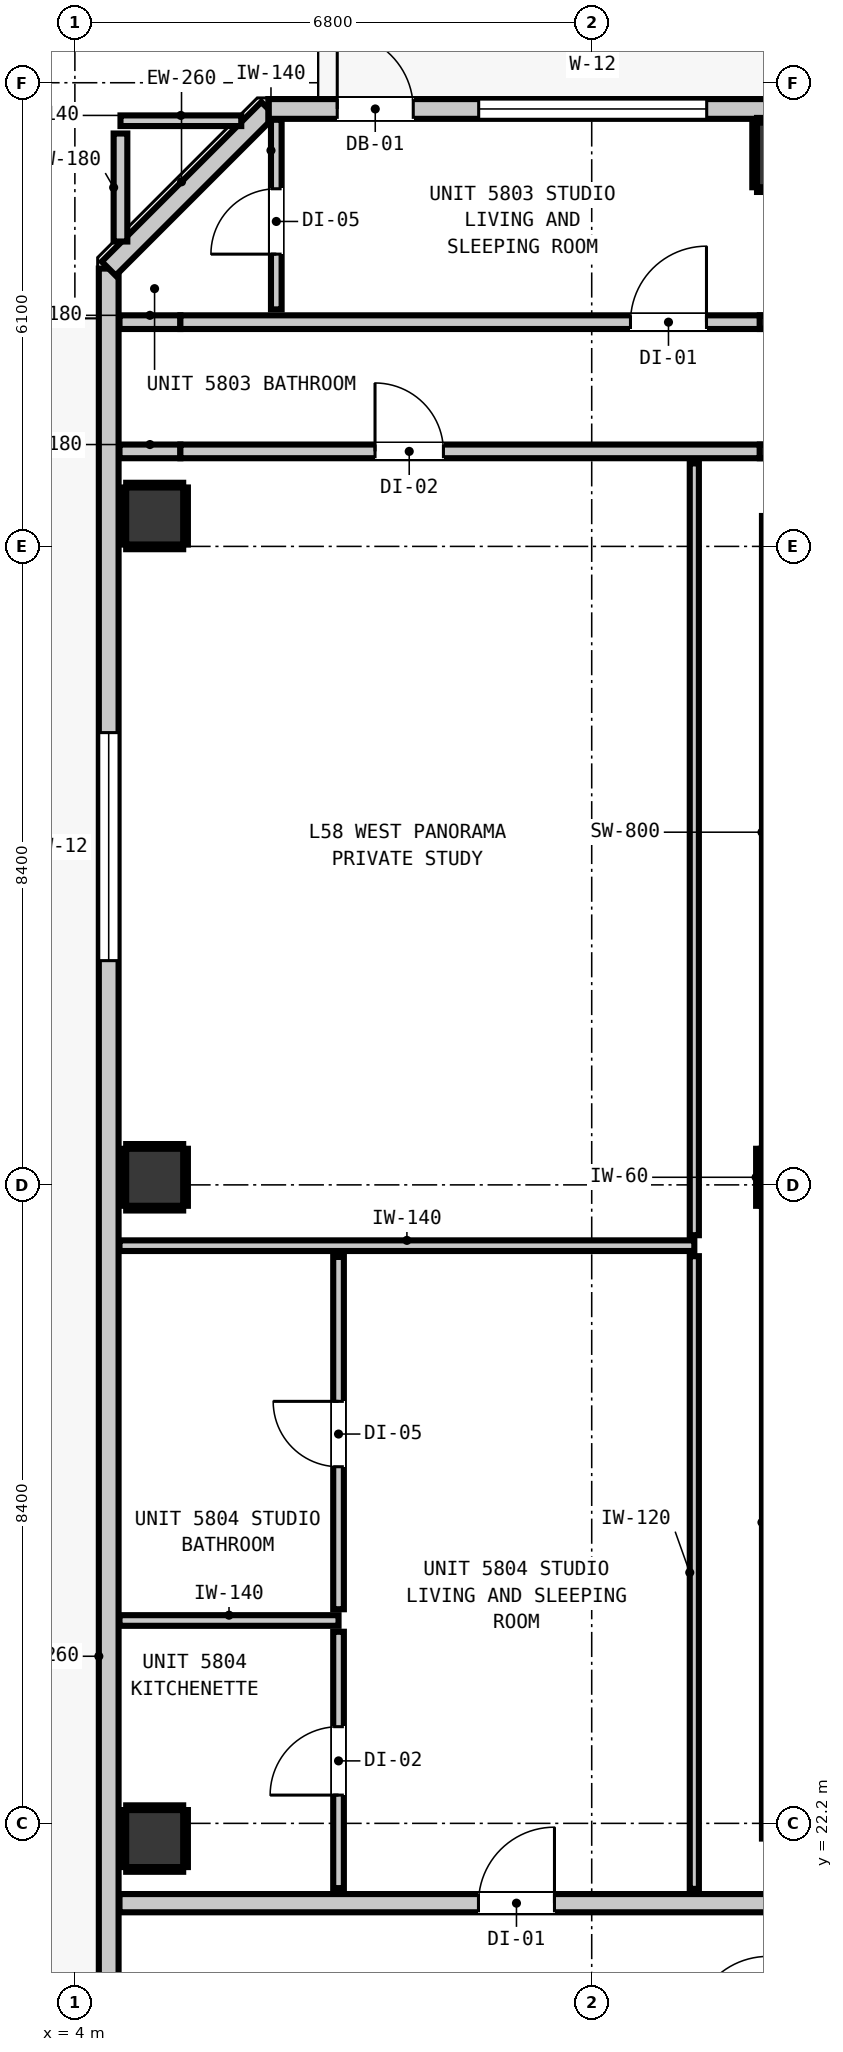
"""IFC4 building model, lengths in metres.
Left out: names, types, materials, properties, quantities, classifications, styles, units other than length and angle.
Written with IfcOpenShell. Run it as: python <this file> out.ifc"""

import sys

from ifc_helpers import new_model, si_unit, direction, frame, frame_2d, origin, origin_2d, place, context, subcontext, project, spatial, rectangle, extrude, element, fill, save


model = new_model("IFC4")
c1 = context("Model", 3, precision=1e-05, world=origin(), true_north=direction((0.0, 1.0)))
c2 = subcontext(c1, "Body", "Model", "MODEL_VIEW")
j1 = project(units=[si_unit("LENGTHUNIT", "METRE"), si_unit("PLANEANGLEUNIT", "RADIAN")], contexts=[c1])
p1 = place(None, origin())
s1 = spatial("IfcSite", under=j1, at=p1, CompositionType="ELEMENT")
p2 = place(p1, origin())
s2 = spatial("IfcBuilding", under=s1, at=p2, CompositionType="ELEMENT")
p3 = place(p2, frame((0.0, 0.0, 200.12)))
s3 = spatial("IfcBuildingStorey", under=s2, at=p3, CompositionType="ELEMENT", Elevation=200.12)
p4 = place(p3, frame((13.4, 30.7, 0.0), z_axis=(0.0, 0.0, 1.0), x_axis=(1.0, 0.0, 0.0)))
e1 = element("IfcColumn", 1, at=p4, inside=s3, PredefinedType="COLUMN", context=c2, shape_type="SweptSolid", body=[
    extrude(rectangle(XDim=0.75, YDim=0.75, at=origin_2d()), origin(), (0.0, 0.0, 1.0), 3.32),
])
p5 = place(p3, frame((13.44, 22.0, 0.0), z_axis=(0.0, 0.0, 1.0), x_axis=(0.0, 1.0, 0.0)))
e2 = element("IfcWall", 2, at=p5, inside=s3, PredefinedType="SHEAR", context=c2, shape_type="SweptSolid", body=[
    extrude(rectangle(XDim=8.32, YDim=0.8, at=frame_2d((4.16, 0.0))), origin(), (0.0, 0.0, 1.0), 3.32),
])
p6 = place(p3, frame((13.44, 31.08, 0.0), z_axis=(0.0, 0.0, 1.0), x_axis=(0.0, 1.0, 0.0)))
e3 = element("IfcWall", 3, at=p6, inside=s3, PredefinedType="SHEAR", context=c2, shape_type="SweptSolid", body=[
    extrude(rectangle(XDim=8.32, YDim=0.8, at=frame_2d((4.16, 0.0))), origin(), (0.0, 0.0, 1.0), 3.32),
])
p7 = place(p3, frame((13.4, 44.15, 0.0), z_axis=(0.0, 0.0, 1.0), x_axis=(1.0, 0.0, 0.0)))
e4 = element("IfcColumn", 4, at=p7, inside=s3, PredefinedType="COLUMN", context=c2, shape_type="SweptSolid", body=[
    extrude(rectangle(XDim=0.85, YDim=0.85, at=origin_2d()), origin(), (0.0, 0.0, 1.0), 3.32),
])
for number, where, z_axis, x_axis in (
    (5, (5.05, 22.0, 0.0), (0.0, 0.0, 1.0), (1.0, 0.0, 0.0)),
    (6, (5.05, 30.7, 0.0), (0.0, 0.0, 1.0), (1.0, 0.0, 0.0)),
    (7, (5.05, 39.4, 0.0), (0.0, 0.0, 1.0), (1.0, 0.0, 0.0)),
):
    element("IfcColumn", number, at=place(p3, frame(where, z_axis=z_axis, x_axis=x_axis)), inside=s3, PredefinedType="COLUMN", context=c2, shape_type="SweptSolid", body=[
        extrude(rectangle(XDim=0.75, YDim=0.75, at=origin_2d()), origin(), (0.0, 0.0, 1.0), 3.32),
    ])
p8 = place(p3, frame((4.445, 12.345, 0.0), z_axis=(0.0, 0.0, 1.0), x_axis=(0.0, 1.0, 0.0)))
e8 = element("IfcWall", 8, at=p8, inside=s3, PredefinedType="STANDARD", context=c2, shape_type="SweptSolid", body=[
    extrude(rectangle(XDim=30.31, YDim=0.26, at=frame_2d((15.155, 0.0))), origin(), (0.0, 0.0, 1.0), 3.1),
])
p9 = place(p8, frame((0.91, 0.0, 0.0)))
e9 = element("IfcOpeningElement", 9, at=p9, cuts=e8, PredefinedType="OPENING", context=c2, shape_type="SweptSolid", body=[
    extrude(rectangle(XDim=1.0, YDim=2.15, at=frame_2d((0.5, 1.075))), frame((0.0, 0.14, 0.0), z_axis=(0.0, -1.0, 0.0), x_axis=(1.0, 0.0, 0.0)), (0.0, 0.0, 1.0), 0.28),
])
p10 = place(p8, frame((2.322, 0.0, 0.85)))
e10 = element("IfcOpeningElement", 10, at=p10, cuts=e8, PredefinedType="OPENING", context=c2, shape_type="SweptSolid", body=[
    extrude(rectangle(XDim=0.58, YDim=1.5, at=frame_2d((0.29, 0.75))), frame((0.0, 0.14, 0.0), z_axis=(0.0, -1.0, 0.0), x_axis=(1.0, 0.0, 0.0)), (0.0, 0.0, 1.0), 0.28),
])
p11 = place(p8, frame((21.205, 0.0, 0.85)))
e11 = element("IfcOpeningElement", 11, at=p11, cuts=e8, PredefinedType="OPENING", context=c2, shape_type="SweptSolid", body=[
    extrude(rectangle(XDim=3.0, YDim=2.1, at=frame_2d((1.5, 1.05))), frame((0.0, 0.14, 0.0), z_axis=(0.0, -1.0, 0.0), x_axis=(1.0, 0.0, 0.0)), (0.0, 0.0, 1.0), 0.28),
])
p12 = place(p3, frame((4.445, 42.655, 0.0), z_axis=(0.0, 0.0, 1.0), x_axis=(0.707106781187, 0.707106781187, 0.0)))
e12 = element("IfcWall", 12, at=p12, inside=s3, PredefinedType="STANDARD", context=c2, shape_type="SweptSolid", body=[
    extrude(rectangle(XDim=2.97, YDim=0.26, at=frame_2d((1.485, 0.0))), origin(), (0.0, 0.0, 1.0), 3.1),
])
p13 = place(p3, frame((6.545, 44.755, 0.0), z_axis=(0.0, 0.0, 1.0), x_axis=(1.0, 0.0, 0.0)))
e13 = element("IfcWall", 13, at=p13, inside=s3, PredefinedType="STANDARD", context=c2, shape_type="SweptSolid", body=[
    extrude(rectangle(XDim=32.71, YDim=0.26, at=frame_2d((16.355, 0.0))), origin(), (0.0, 0.0, 1.0), 3.1),
])
p14 = place(p13, frame((0.907, 0.0, 0.0)))
e14 = element("IfcOpeningElement", 14, at=p14, cuts=e13, PredefinedType="OPENING", context=c2, shape_type="SweptSolid", body=[
    extrude(rectangle(XDim=1.0, YDim=2.15, at=frame_2d((0.5, 1.075))), frame((0.0, 0.14, 0.0), z_axis=(0.0, -1.0, 0.0), x_axis=(1.0, 0.0, 0.0)), (0.0, 0.0, 1.0), 0.28),
])
p15 = place(p13, frame((2.768, 0.0, 0.85)))
e15 = element("IfcOpeningElement", 15, at=p15, cuts=e13, PredefinedType="OPENING", context=c2, shape_type="SweptSolid", body=[
    extrude(rectangle(XDim=3.0, YDim=2.1, at=frame_2d((1.5, 1.05))), frame((0.0, 0.14, 0.0), z_axis=(0.0, -1.0, 0.0), x_axis=(1.0, 0.0, 0.0)), (0.0, 0.0, 1.0), 0.28),
])
p16 = place(p13, frame((16.955, 0.0, 0.85)))
e16 = element("IfcOpeningElement", 16, at=p16, cuts=e13, PredefinedType="OPENING", context=c2, shape_type="SweptSolid", body=[
    extrude(rectangle(XDim=3.0, YDim=2.1, at=frame_2d((1.5, 1.05))), frame((0.0, 0.14, 0.0), z_axis=(0.0, -1.0, 0.0), x_axis=(1.0, 0.0, 0.0)), (0.0, 0.0, 1.0), 0.28),
])
p17 = place(p3, frame((4.587, 21.15, 0.0), z_axis=(0.0, 0.0, 1.0), x_axis=(1.0, 0.0, 0.0)))
e17 = element("IfcWall", 17, at=p17, inside=s3, PredefinedType="PARTITIONING", context=c2, shape_type="SweptSolid", body=[
    extrude(rectangle(XDim=36.626, YDim=0.24, at=frame_2d((18.313, 0.0))), origin(), (0.0, 0.0, 1.0), 3.1),
])
p18 = place(p17, frame((13.623, 0.0, 0.0)))
e18 = element("IfcOpeningElement", 18, at=p18, cuts=e17, PredefinedType="OPENING", context=c2, shape_type="SweptSolid", body=[
    extrude(rectangle(XDim=1.1, YDim=2.15, at=frame_2d((0.55, 1.075))), frame((0.0, 0.13, 0.0), z_axis=(0.0, -1.0, 0.0), x_axis=(1.0, 0.0, 0.0)), (0.0, 0.0, 1.0), 0.26),
])
p19 = place(p17, frame((4.723, 0.0, 0.0)))
e19 = element("IfcOpeningElement", 19, at=p19, cuts=e17, PredefinedType="OPENING", context=c2, shape_type="SweptSolid", body=[
    extrude(rectangle(XDim=1.0, YDim=2.15, at=frame_2d((0.5, 1.075))), frame((0.0, 0.13, 0.0), z_axis=(0.0, -1.0, 0.0), x_axis=(1.0, 0.0, 0.0)), (0.0, 0.0, 1.0), 0.26),
])
p20 = place(p3, frame((4.587, 40.25, 0.0), z_axis=(0.0, 0.0, 1.0), x_axis=(1.0, 0.0, 0.0)))
e20 = element("IfcWall", 20, at=p20, inside=s3, PredefinedType="PARTITIONING", context=c2, shape_type="SweptSolid", body=[
    extrude(rectangle(XDim=0.801, YDim=0.18, at=frame_2d((0.4, 0.0))), origin(), (0.0, 0.0, 1.0), 3.1),
])
p21 = place(p3, frame((5.388, 40.25, 0.0), z_axis=(0.0, 0.0, 1.0), x_axis=(1.0, 0.0, 0.0)))
e21 = element("IfcWall", 21, at=p21, inside=s3, PredefinedType="PARTITIONING", context=c2, shape_type="SweptSolid", body=[
    extrude(rectangle(XDim=7.624, YDim=0.18, at=frame_2d((3.812, 0.0))), origin(), (0.0, 0.0, 1.0), 2.477),
])
p22 = place(p21, frame((2.561, 0.0, 0.0)))
e22 = element("IfcOpeningElement", 22, at=p22, cuts=e21, PredefinedType="OPENING", context=c2, shape_type="SweptSolid", body=[
    extrude(rectangle(XDim=0.9, YDim=2.1, at=frame_2d((0.45, 1.05))), frame((0.0, 0.1, 0.0), z_axis=(0.0, -1.0, 0.0), x_axis=(1.0, 0.0, 0.0)), (0.0, 0.0, 1.0), 0.2),
])
p23 = place(p3, frame((13.012, 40.25, 0.0), z_axis=(0.0, 0.0, 1.0), x_axis=(1.0, 0.0, 0.0)))
e23 = element("IfcWall", 23, at=p23, inside=s3, PredefinedType="PARTITIONING", context=c2, shape_type="SweptSolid", body=[
    extrude(rectangle(XDim=28.201, YDim=0.18, at=frame_2d((14.101, 0.0))), origin(), (0.0, 0.0, 1.0), 3.1),
])
p24 = place(p23, frame((4.423, 0.0, 0.0)))
e24 = element("IfcOpeningElement", 24, at=p24, cuts=e23, PredefinedType="OPENING", context=c2, shape_type="SweptSolid", body=[
    extrude(rectangle(XDim=1.4, YDim=2.15, at=frame_2d((0.7, 1.075))), frame((0.0, 0.1, 0.0), z_axis=(0.0, -1.0, 0.0), x_axis=(1.0, 0.0, 0.0)), (0.0, 0.0, 1.0), 0.2),
])
p25 = place(p3, frame((4.587, 41.95, 0.0), z_axis=(0.0, 0.0, 1.0), x_axis=(1.0, 0.0, 0.0)))
e25 = element("IfcWall", 25, at=p25, inside=s3, PredefinedType="PARTITIONING", context=c2, shape_type="SweptSolid", body=[
    extrude(rectangle(XDim=0.801, YDim=0.18, at=frame_2d((0.4, 0.0))), origin(), (0.0, 0.0, 1.0), 3.1),
])
p26 = place(p3, frame((5.388, 41.95, 0.0), z_axis=(0.0, 0.0, 1.0), x_axis=(1.0, 0.0, 0.0)))
e26 = element("IfcWall", 26, at=p26, inside=s3, PredefinedType="PARTITIONING", context=c2, shape_type="SweptSolid", body=[
    extrude(rectangle(XDim=7.624, YDim=0.18, at=frame_2d((3.812, 0.0))), origin(), (0.0, 0.0, 1.0), 2.477),
])
p27 = place(p26, frame((5.922, 0.0, 0.0)))
e27 = element("IfcOpeningElement", 27, at=p27, cuts=e26, PredefinedType="OPENING", context=c2, shape_type="SweptSolid", body=[
    extrude(rectangle(XDim=1.0, YDim=2.15, at=frame_2d((0.5, 1.075))), frame((0.0, 0.1, 0.0), z_axis=(0.0, -1.0, 0.0), x_axis=(1.0, 0.0, 0.0)), (0.0, 0.0, 1.0), 0.2),
])
p28 = place(p3, frame((13.012, 41.95, 0.0), z_axis=(0.0, 0.0, 1.0), x_axis=(1.0, 0.0, 0.0)))
e28 = element("IfcWall", 28, at=p28, inside=s3, PredefinedType="PARTITIONING", context=c2, shape_type="SweptSolid", body=[
    extrude(rectangle(XDim=28.201, YDim=0.18, at=frame_2d((14.101, 0.0))), origin(), (0.0, 0.0, 1.0), 3.1),
])
p29 = place(p28, frame((16.674, 0.0, 0.0)))
e29 = element("IfcOpeningElement", 29, at=p29, cuts=e28, PredefinedType="OPENING", context=c2, shape_type="SweptSolid", body=[
    extrude(rectangle(XDim=0.9, YDim=2.1, at=frame_2d((0.45, 1.05))), frame((0.0, 0.1, 0.0), z_axis=(0.0, -1.0, 0.0), x_axis=(1.0, 0.0, 0.0)), (0.0, 0.0, 1.0), 0.2),
])
p30 = place(p3, frame((4.587, 24.869, 0.0), z_axis=(0.0, 0.0, 1.0), x_axis=(1.0, 0.0, 0.0)))
e30 = element("IfcWall", 30, at=p30, inside=s3, PredefinedType="PARTITIONING", context=c2, shape_type="SweptSolid", body=[
    extrude(rectangle(XDim=2.882, YDim=0.14, at=frame_2d((1.441, 0.0))), origin(), (0.0, 0.0, 1.0), 3.1),
])
p31 = place(p3, frame((4.587, 29.8, 0.0), z_axis=(0.0, 0.0, 1.0), x_axis=(1.0, 0.0, 0.0)))
e31 = element("IfcWall", 31, at=p31, inside=s3, PredefinedType="PARTITIONING", context=c2, shape_type="SweptSolid", body=[
    extrude(rectangle(XDim=7.563, YDim=0.14, at=frame_2d((3.781, 0.0))), origin(), (0.0, 0.0, 1.0), 3.1),
])
p32 = place(p3, frame((4.6, 44.6, 0.0), z_axis=(0.0, 0.0, 1.0), x_axis=(1.0, 0.0, 0.0)))
e32 = element("IfcWall", 32, at=p32, inside=s3, PredefinedType="PARTITIONING", context=c2, shape_type="SweptSolid", body=[
    extrude(rectangle(XDim=1.589, YDim=0.14, at=frame_2d((0.794, 0.0))), origin(), (0.0, 0.0, 1.0), 3.1),
])
p33 = place(p3, frame((4.6, 43.011, 0.0), z_axis=(0.0, 0.0, 1.0), x_axis=(0.0, 1.0, 0.0)))
e33 = element("IfcWall", 33, at=p33, inside=s3, PredefinedType="PARTITIONING", context=c2, shape_type="SweptSolid", body=[
    extrude(rectangle(XDim=1.421, YDim=0.18, at=frame_2d((0.71, 0.0))), origin(), (0.0, 0.0, 1.0), 3.1),
])
p34 = place(p3, frame((6.65, 42.118, 0.0), z_axis=(0.0, 0.0, 1.0), x_axis=(0.0, 1.0, 0.0)))
e34 = element("IfcWall", 34, at=p34, inside=s3, PredefinedType="PARTITIONING", context=c2, shape_type="SweptSolid", body=[
    extrude(rectangle(XDim=2.495, YDim=0.14, at=frame_2d((1.248, 0.0))), origin(), (0.0, 0.0, 1.0), 3.1),
])
p35 = place(p34, frame((0.727, 0.0, 0.0)))
e35 = element("IfcOpeningElement", 35, at=p35, cuts=e34, PredefinedType="OPENING", context=c2, shape_type="SweptSolid", body=[
    extrude(rectangle(XDim=0.86, YDim=2.02, at=frame_2d((0.43, 1.01))), frame((0.0, 0.08, 0.0), z_axis=(0.0, -1.0, 0.0), x_axis=(1.0, 0.0, 0.0)), (0.0, 0.0, 1.0), 0.16),
])
p36 = place(p3, frame((7.469, 21.348, 0.0), z_axis=(0.0, 0.0, 1.0), x_axis=(0.0, 1.0, 0.0)))
e36 = element("IfcWall", 36, at=p36, inside=s3, PredefinedType="PARTITIONING", context=c2, shape_type="SweptSolid", body=[
    extrude(rectangle(XDim=3.373, YDim=0.14, at=frame_2d((1.687, 0.0))), origin(), (0.0, 0.0, 1.0), 3.1),
])
p37 = place(p36, frame((1.224, 0.0, 0.0)))
e37 = element("IfcOpeningElement", 37, at=p37, cuts=e36, PredefinedType="OPENING", context=c2, shape_type="SweptSolid", body=[
    extrude(rectangle(XDim=0.9, YDim=2.1, at=frame_2d((0.45, 1.05))), frame((0.0, 0.08, 0.0), z_axis=(0.0, -1.0, 0.0), x_axis=(1.0, 0.0, 0.0)), (0.0, 0.0, 1.0), 0.16),
])
p38 = place(p3, frame((7.469, 25.017, 0.0), z_axis=(0.0, 0.0, 1.0), x_axis=(0.0, 1.0, 0.0)))
e38 = element("IfcWall", 38, at=p38, inside=s3, PredefinedType="PARTITIONING", context=c2, shape_type="SweptSolid", body=[
    extrude(rectangle(XDim=4.635, YDim=0.14, at=frame_2d((2.317, 0.0))), origin(), (0.0, 0.0, 1.0), 3.1),
])
p39 = place(p38, frame((1.875, 0.0, 0.0)))
e39 = element("IfcOpeningElement", 39, at=p39, cuts=e38, PredefinedType="OPENING", context=c2, shape_type="SweptSolid", body=[
    extrude(rectangle(XDim=0.86, YDim=2.02, at=frame_2d((0.43, 1.01))), frame((0.0, 0.08, 0.0), z_axis=(0.0, -1.0, 0.0), x_axis=(1.0, 0.0, 0.0)), (0.0, 0.0, 1.0), 0.16),
])
p40 = place(p3, frame((12.15, 21.338, 0.0), z_axis=(0.0, 0.0, 1.0), x_axis=(0.0, 1.0, 0.0)))
e40 = element("IfcWall", 40, at=p40, inside=s3, PredefinedType="PARTITIONING", context=c2, shape_type="SweptSolid", body=[
    extrude(rectangle(XDim=8.324, YDim=0.12, at=frame_2d((4.162, 0.0))), origin(), (0.0, 0.0, 1.0), 3.1),
])
p41 = place(p3, frame((12.15, 29.938, 0.0), z_axis=(0.0, 0.0, 1.0), x_axis=(0.0, 1.0, 0.0)))
e41 = element("IfcWall", 41, at=p41, inside=s3, PredefinedType="PARTITIONING", context=c2, shape_type="SweptSolid", body=[
    extrude(rectangle(XDim=10.154, YDim=0.12, at=frame_2d((5.077, 0.0))), origin(), (0.0, 0.0, 1.0), 3.1),
])
p42 = place(p3, frame((12.993, 30.325, 0.0), z_axis=(0.0, 0.0, 1.0), x_axis=(0.0, 1.0, 0.0)))
e42 = element("IfcWall", 42, at=p42, inside=s3, PredefinedType="PARTITIONING", context=c2, shape_type="SweptSolid", body=[
    extrude(rectangle(XDim=0.75, YDim=0.06, at=frame_2d((0.375, 0.0))), origin(), (0.0, 0.0, 1.0), 1.45),
])
for number, where, z_axis, x_axis in (
    (43, (12.975, 43.693, 0.0), (0.0, 0.0, 1.0), (1.0, 0.0, 0.0)),
    (44, (12.975, 44.607, 0.0), (0.0, 0.0, 1.0), (1.0, 0.0, 0.0)),
    (45, (12.943, 43.725, 0.0), (0.0, 0.0, 1.0), (0.0, 1.0, 0.0)),
):
    element("IfcWall", number, at=place(p3, frame(where, z_axis=z_axis, x_axis=x_axis)), inside=s3, PredefinedType="PARTITIONING", context=c2, shape_type="SweptSolid", body=[
        extrude(rectangle(XDim=0.85, YDim=0.06, at=frame_2d((0.425, 0.0))), origin(), (0.0, 0.0, 1.0), 1.45),
    ])
for number, where, z_axis, x_axis in (
    (46, (4.675, 21.593, 0.0), (0.0, 0.0, 1.0), (1.0, 0.0, 0.0)),
    (47, (4.675, 22.407, 0.0), (0.0, 0.0, 1.0), (1.0, 0.0, 0.0)),
    (48, (4.643, 21.625, 0.0), (0.0, 0.0, 1.0), (0.0, 1.0, 0.0)),
    (49, (5.457, 21.625, 0.0), (0.0, 0.0, 1.0), (0.0, 1.0, 0.0)),
    (50, (4.675, 30.293, 0.0), (0.0, 0.0, 1.0), (1.0, 0.0, 0.0)),
    (51, (4.675, 31.107, 0.0), (0.0, 0.0, 1.0), (1.0, 0.0, 0.0)),
    (52, (4.643, 30.325, 0.0), (0.0, 0.0, 1.0), (0.0, 1.0, 0.0)),
    (53, (5.457, 30.325, 0.0), (0.0, 0.0, 1.0), (0.0, 1.0, 0.0)),
    (54, (4.675, 38.993, 0.0), (0.0, 0.0, 1.0), (1.0, 0.0, 0.0)),
    (55, (4.675, 39.807, 0.0), (0.0, 0.0, 1.0), (1.0, 0.0, 0.0)),
    (56, (4.643, 39.025, 0.0), (0.0, 0.0, 1.0), (0.0, 1.0, 0.0)),
    (57, (5.457, 39.025, 0.0), (0.0, 0.0, 1.0), (0.0, 1.0, 0.0)),
):
    element("IfcWall", number, at=place(p3, frame(where, z_axis=z_axis, x_axis=x_axis)), inside=s3, PredefinedType="PARTITIONING", context=c2, shape_type="SweptSolid", body=[
        extrude(rectangle(XDim=0.75, YDim=0.06, at=frame_2d((0.375, 0.0))), origin(), (0.0, 0.0, 1.0), 1.45),
    ])
p43 = place(p14, origin())
e58 = element("IfcDoor", 58, at=p43, inside=s3, OperationType="SINGLE_SWING_LEFT", PredefinedType="DOOR", context=c2, shape_type="SweptSolid", body=[
    extrude(rectangle(XDim=1.0, YDim=2.15, at=frame_2d((0.5, 1.075))), frame((0.0, 0.025, 0.0), z_axis=(0.0, -1.0, 0.0), x_axis=(1.0, 0.0, 0.0)), (0.0, 0.0, 1.0), 0.05),
])
fill(e14, e58)
p44 = place(p11, origin())
e59 = element("IfcWindow", 59, at=p44, inside=s3, PartitioningType="SINGLE_PANEL", PredefinedType="WINDOW", context=c2, shape_type="SweptSolid", body=[
    extrude(rectangle(XDim=3.0, YDim=2.1, at=frame_2d((1.5, 1.05))), frame((0.0, 0.03, 0.0), z_axis=(0.0, -1.0, 0.0), x_axis=(1.0, 0.0, 0.0)), (0.0, 0.0, 1.0), 0.06),
])
fill(e11, e59)
p45 = place(p15, origin())
e60 = element("IfcWindow", 60, at=p45, inside=s3, PartitioningType="SINGLE_PANEL", PredefinedType="WINDOW", context=c2, shape_type="SweptSolid", body=[
    extrude(rectangle(XDim=3.0, YDim=2.1, at=frame_2d((1.5, 1.05))), frame((0.0, 0.03, 0.0), z_axis=(0.0, -1.0, 0.0), x_axis=(1.0, 0.0, 0.0)), (0.0, 0.0, 1.0), 0.06),
])
fill(e15, e60)
p46 = place(p27, origin())
e61 = element("IfcDoor", 61, at=p46, inside=s3, OperationType="SINGLE_SWING_RIGHT", PredefinedType="DOOR", context=c2, shape_type="SweptSolid", body=[
    extrude(rectangle(XDim=1.0, YDim=2.15, at=frame_2d((0.5, 1.075))), frame((0.0, 0.025, 0.0), z_axis=(0.0, -1.0, 0.0), x_axis=(1.0, 0.0, 0.0)), (0.0, 0.0, 1.0), 0.05),
])
fill(e27, e61)
p47 = place(p35, origin())
e62 = element("IfcDoor", 62, at=p47, inside=s3, OperationType="SINGLE_SWING_LEFT", PredefinedType="DOOR", context=c2, shape_type="SweptSolid", body=[
    extrude(rectangle(XDim=0.86, YDim=2.02, at=frame_2d((0.43, 1.01))), frame((0.0, 0.025, 0.0), z_axis=(0.0, -1.0, 0.0), x_axis=(1.0, 0.0, 0.0)), (0.0, 0.0, 1.0), 0.05),
])
fill(e35, e62)
p48 = place(p19, origin())
e63 = element("IfcDoor", 63, at=p48, inside=s3, OperationType="SINGLE_SWING_RIGHT", PredefinedType="DOOR", context=c2, shape_type="SweptSolid", body=[
    extrude(rectangle(XDim=1.0, YDim=2.15, at=frame_2d((0.5, 1.075))), frame((0.0, 0.025, 0.0), z_axis=(0.0, -1.0, 0.0), x_axis=(1.0, 0.0, 0.0)), (0.0, 0.0, 1.0), 0.05),
])
fill(e19, e63)
p49 = place(p37, origin())
e64 = element("IfcDoor", 64, at=p49, inside=s3, OperationType="SINGLE_SWING_LEFT", PredefinedType="DOOR", context=c2, shape_type="SweptSolid", body=[
    extrude(rectangle(XDim=0.9, YDim=2.1, at=frame_2d((0.45, 1.05))), frame((0.0, 0.025, 0.0), z_axis=(0.0, -1.0, 0.0), x_axis=(1.0, 0.0, 0.0)), (0.0, 0.0, 1.0), 0.05),
])
fill(e37, e64)
p50 = place(p39, origin())
e65 = element("IfcDoor", 65, at=p50, inside=s3, OperationType="SINGLE_SWING_RIGHT", PredefinedType="DOOR", context=c2, shape_type="SweptSolid", body=[
    extrude(rectangle(XDim=0.86, YDim=2.02, at=frame_2d((0.43, 1.01))), frame((0.0, 0.025, 0.0), z_axis=(0.0, -1.0, 0.0), x_axis=(1.0, 0.0, 0.0)), (0.0, 0.0, 1.0), 0.05),
])
fill(e39, e65)
p51 = place(p22, origin())
e66 = element("IfcDoor", 66, at=p51, inside=s3, OperationType="SINGLE_SWING_LEFT", PredefinedType="DOOR", context=c2, shape_type="SweptSolid", body=[
    extrude(rectangle(XDim=0.9, YDim=2.1, at=frame_2d((0.45, 1.05))), frame((0.0, 0.025, 0.0), z_axis=(0.0, -1.0, 0.0), x_axis=(1.0, 0.0, 0.0)), (0.0, 0.0, 1.0), 0.05),
])
fill(e22, e66)
save(model, sys.argv[1])
